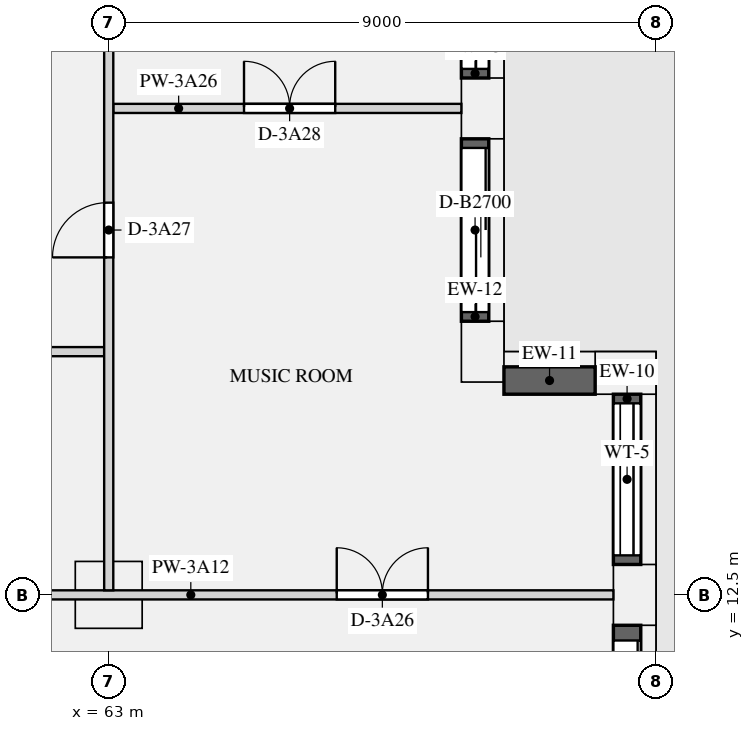
"""IFC4 building model, lengths in metres.
Left out: names, types, materials, properties, quantities, classifications, styles, units other than length and angle.
Written with IfcOpenShell. Run it as: python <this file> out.ifc"""

import sys

from ifc_helpers import new_model, si_unit, direction, frame, frame_2d, origin, origin_2d, place, context, subcontext, project, spatial, rectangle, extrude, element, fill, save


model = new_model("IFC4")
c1 = context("Model", 3, precision=1e-05, world=origin(), true_north=direction((0.0, 1.0)))
c2 = subcontext(c1, "Body", "Model", "MODEL_VIEW")
j1 = project(units=[si_unit("LENGTHUNIT", "METRE"), si_unit("PLANEANGLEUNIT", "RADIAN")], contexts=[c1])
p1 = place(None, origin())
s1 = spatial("IfcSite", under=j1, at=p1, CompositionType="ELEMENT")
p2 = place(p1, origin())
s2 = spatial("IfcBuilding", under=s1, at=p2, CompositionType="ELEMENT")
p3 = place(p2, frame((0.0, 0.0, 141.3)))
s3 = spatial("IfcBuildingStorey", under=s2, at=p3, CompositionType="ELEMENT", Elevation=141.3)
for number, where, z_axis, x_axis in (
    (1, (71.65, 12.5, 0.0), (0.0, 0.0, 1.0), (0.0, 1.0, 0.0)),
    (2, (71.5, 16.15, 0.0), (0.0, 0.0, 1.0), (-1.0, 0.0, 0.0)),
    (3, (69.15, 16.5, 0.0), (0.0, 0.0, 1.0), (0.0, 1.0, 0.0)),
    (4, (69.15, 20.5, 0.0), (0.0, 0.0, 1.0), (0.0, 1.0, 0.0)),
):
    element("IfcColumn", number, at=place(p3, frame(where, z_axis=z_axis, x_axis=x_axis)), inside=s3, PredefinedType="USERDEFINED", context=c2, shape_type="SweptSolid", body=[
        extrude(rectangle(XDim=1.0, YDim=0.7, at=origin_2d()), origin(), (0.0, 0.0, 1.0), 3.15),
    ])
p4 = place(p3, frame((63.0, 12.5, 0.0), z_axis=(0.0, 0.0, 1.0), x_axis=(1.0, 0.0, 0.0)))
e5 = element("IfcColumn", 5, at=p4, inside=s3, PredefinedType="COLUMN", context=c2, shape_type="SweptSolid", body=[
    extrude(rectangle(XDim=1.1, YDim=1.1, at=origin_2d()), origin(), (0.0, 0.0, 1.0), 3.15),
])
p5 = place(p3, frame((71.525, 9.0, 0.0), z_axis=(0.0, 0.0, 1.0), x_axis=(0.0, 1.0, 0.0)))
e6 = element("IfcWall", 6, at=p5, inside=s3, PredefinedType="SOLIDWALL", context=c2, shape_type="SweptSolid", body=[
    extrude(rectangle(XDim=3.0, YDim=0.45, at=frame_2d((1.5, 0.0))), origin(), (0.0, 0.0, 1.0), 2.83),
])
p6 = place(p5, frame((0.25, 0.0, 0.0)))
e7 = element("IfcOpeningElement", 7, at=p6, cuts=e6, PredefinedType="OPENING", context=c2, shape_type="SweptSolid", body=[
    extrude(rectangle(XDim=2.5, YDim=2.3, at=frame_2d((1.25, 1.15))), frame((0.0, 0.235, 0.0), z_axis=(0.0, -1.0, 0.0), x_axis=(1.0, 0.0, 0.0)), (0.0, 0.0, 1.0), 0.47),
])
p7 = place(p3, frame((71.525, 13.0, 0.9), z_axis=(0.0, 0.0, 1.0), x_axis=(0.0, 1.0, 0.0)))
e8 = element("IfcWall", 8, at=p7, inside=s3, PredefinedType="SOLIDWALL", context=c2, shape_type="SweptSolid", body=[
    extrude(rectangle(XDim=2.8, YDim=0.45, at=frame_2d((1.4, 0.0))), origin(), (0.0, 0.0, 1.0), 1.93),
])
p8 = place(p7, frame((0.15, 0.0, 0.15)))
e9 = element("IfcOpeningElement", 9, at=p8, cuts=e8, PredefinedType="OPENING", context=c2, shape_type="SweptSolid", body=[
    extrude(rectangle(XDim=2.5, YDim=1.5, at=frame_2d((1.25, 0.75))), frame((0.0, 0.235, 0.0), z_axis=(0.0, -1.0, 0.0), x_axis=(1.0, 0.0, 0.0)), (0.0, 0.0, 1.0), 0.47),
])
p9 = place(p3, frame((71.0, 16.025, 0.9), z_axis=(0.0, 0.0, 1.0), x_axis=(-1.0, 0.0, 0.0)))
e10 = element("IfcWall", 10, at=p9, inside=s3, PredefinedType="SOLIDWALL", context=c2, shape_type="SweptSolid", body=[
    extrude(rectangle(XDim=1.5, YDim=0.45, at=frame_2d((0.75, 0.0))), origin(), (0.0, 0.0, 1.0), 1.93),
])
p10 = place(p3, frame((69.025, 17.0, 0.0), z_axis=(0.0, 0.0, 1.0), x_axis=(0.0, 1.0, 0.0)))
e11 = element("IfcWall", 11, at=p10, inside=s3, PredefinedType="SOLIDWALL", context=c2, shape_type="SweptSolid", body=[
    extrude(rectangle(XDim=3.0, YDim=0.45, at=frame_2d((1.5, 0.0))), origin(), (0.0, 0.0, 1.0), 2.83),
])
p11 = place(p10, frame((0.15, 0.0, 0.0)))
e12 = element("IfcOpeningElement", 12, at=p11, cuts=e11, PredefinedType="OPENING", context=c2, shape_type="SweptSolid", body=[
    extrude(rectangle(XDim=2.7, YDim=2.3, at=frame_2d((1.35, 1.15))), frame((0.0, 0.235, 0.0), z_axis=(0.0, -1.0, 0.0), x_axis=(1.0, 0.0, 0.0)), (0.0, 0.0, 1.0), 0.47),
])
p12 = place(p3, frame((69.025, 21.0, 0.0), z_axis=(0.0, 0.0, 1.0), x_axis=(0.0, 1.0, 0.0)))
e13 = element("IfcWall", 13, at=p12, inside=s3, PredefinedType="SOLIDWALL", context=c2, shape_type="SweptSolid", body=[
    extrude(rectangle(XDim=3.0, YDim=0.45, at=frame_2d((1.5, 0.0))), origin(), (0.0, 0.0, 1.0), 2.83),
])
p13 = place(p12, frame((0.15, 0.0, 0.0)))
e14 = element("IfcOpeningElement", 14, at=p13, cuts=e13, PredefinedType="OPENING", context=c2, shape_type="SweptSolid", body=[
    extrude(rectangle(XDim=2.7, YDim=2.3, at=frame_2d((1.35, 1.15))), frame((0.0, 0.235, 0.0), z_axis=(0.0, -1.0, 0.0), x_axis=(1.0, 0.0, 0.0)), (0.0, 0.0, 1.0), 0.47),
])
p14 = place(p3, frame((54.0, 12.5, 0.0), z_axis=(0.0, 0.0, 1.0), x_axis=(1.0, 0.0, 0.0)))
e15 = element("IfcWall", 15, at=p14, inside=s3, PredefinedType="PARTITIONING", context=c2, shape_type="SweptSolid", body=[
    extrude(rectangle(XDim=17.3, YDim=0.15, at=frame_2d((8.65, 0.0))), origin(), (0.0, 0.0, 1.0), 2.83),
])
p15 = place(p14, frame((1.5, 0.0, 0.0)))
e16 = element("IfcOpeningElement", 16, at=p15, cuts=e15, PredefinedType="OPENING", context=c2, shape_type="SweptSolid", body=[
    extrude(rectangle(XDim=1.5, YDim=2.1, at=frame_2d((0.75, 1.05))), frame((0.0, 0.085, 0.0), z_axis=(0.0, -1.0, 0.0), x_axis=(1.0, 0.0, 0.0)), (0.0, 0.0, 1.0), 0.17),
])
p16 = place(p14, frame((7.05, 0.0, 0.0)))
e17 = element("IfcOpeningElement", 17, at=p16, cuts=e15, PredefinedType="OPENING", context=c2, shape_type="SweptSolid", body=[
    extrude(rectangle(XDim=0.9, YDim=2.1, at=frame_2d((0.45, 1.05))), frame((0.0, 0.085, 0.0), z_axis=(0.0, -1.0, 0.0), x_axis=(1.0, 0.0, 0.0)), (0.0, 0.0, 1.0), 0.17),
])
p17 = place(p14, frame((12.75, 0.0, 0.0)))
e18 = element("IfcOpeningElement", 18, at=p17, cuts=e15, PredefinedType="OPENING", context=c2, shape_type="SweptSolid", body=[
    extrude(rectangle(XDim=1.5, YDim=2.1, at=frame_2d((0.75, 1.05))), frame((0.0, 0.085, 0.0), z_axis=(0.0, -1.0, 0.0), x_axis=(1.0, 0.0, 0.0)), (0.0, 0.0, 1.0), 0.17),
])
p18 = place(p3, frame((58.575, 16.5, 0.0), z_axis=(0.0, 0.0, 1.0), x_axis=(1.0, 0.0, 0.0)))
e19 = element("IfcWall", 19, at=p18, inside=s3, PredefinedType="PARTITIONING", context=c2, shape_type="SweptSolid", body=[
    extrude(rectangle(XDim=4.35, YDim=0.15, at=frame_2d((2.175, 0.0))), origin(), (0.0, 0.0, 1.0), 2.83),
])
p19 = place(p3, frame((63.075, 20.5, 0.0), z_axis=(0.0, 0.0, 1.0), x_axis=(1.0, 0.0, 0.0)))
e20 = element("IfcWall", 20, at=p19, inside=s3, PredefinedType="PARTITIONING", context=c2, shape_type="SweptSolid", body=[
    extrude(rectangle(XDim=5.725, YDim=0.15, at=frame_2d((2.863, 0.0))), origin(), (0.0, 0.0, 1.0), 2.83),
])
p20 = place(p19, frame((2.15, 0.0, 0.0)))
e21 = element("IfcOpeningElement", 21, at=p20, cuts=e20, PredefinedType="OPENING", context=c2, shape_type="SweptSolid", body=[
    extrude(rectangle(XDim=1.5, YDim=2.1, at=frame_2d((0.75, 1.05))), frame((0.0, 0.085, 0.0), z_axis=(0.0, -1.0, 0.0), x_axis=(1.0, 0.0, 0.0)), (0.0, 0.0, 1.0), 0.17),
])
p21 = place(p3, frame((63.0, 12.575, 0.0), z_axis=(0.0, 0.0, 1.0), x_axis=(0.0, 1.0, 0.0)))
e22 = element("IfcWall", 22, at=p21, inside=s3, PredefinedType="PARTITIONING", context=c2, shape_type="SweptSolid", body=[
    extrude(rectangle(XDim=15.85, YDim=0.15, at=frame_2d((7.925, 0.0))), origin(), (0.0, 0.0, 1.0), 2.83),
])
p22 = place(p21, frame((5.475, 0.0, 0.0)))
e23 = element("IfcOpeningElement", 23, at=p22, cuts=e22, PredefinedType="OPENING", context=c2, shape_type="SweptSolid", body=[
    extrude(rectangle(XDim=0.9, YDim=2.1, at=frame_2d((0.45, 1.05))), frame((0.0, 0.085, 0.0), z_axis=(0.0, -1.0, 0.0), x_axis=(1.0, 0.0, 0.0)), (0.0, 0.0, 1.0), 0.17),
])
p23 = place(p6, origin())
e24 = element("IfcDoor", 24, at=p23, inside=s3, OperationType="SLIDING_TO_LEFT", PredefinedType="DOOR", context=c2, shape_type="SweptSolid", body=[
    extrude(rectangle(XDim=2.5, YDim=2.3, at=frame_2d((1.25, 1.15))), frame((0.0, -0.07, 0.0), z_axis=(0.0, -1.0, 0.0), x_axis=(1.0, 0.0, 0.0)), (0.0, 0.0, 1.0), 0.05),
])
fill(e7, e24)
p24 = place(p8, origin())
e25 = element("IfcWindow", 25, at=p24, inside=s3, PartitioningType="SINGLE_PANEL", PredefinedType="WINDOW", context=c2, shape_type="SweptSolid", body=[
    extrude(rectangle(XDim=2.5, YDim=1.5, at=frame_2d((1.25, 0.75))), frame((0.0, -0.065, 0.0), z_axis=(0.0, -1.0, 0.0), x_axis=(1.0, 0.0, 0.0)), (0.0, 0.0, 1.0), 0.06),
])
fill(e9, e25)
p25 = place(p11, origin())
e26 = element("IfcDoor", 26, at=p25, inside=s3, OperationType="SLIDING_TO_LEFT", PredefinedType="DOOR", context=c2, shape_type="SweptSolid", body=[
    extrude(rectangle(XDim=2.7, YDim=2.3, at=frame_2d((1.35, 1.15))), frame((0.0, -0.07, 0.0), z_axis=(0.0, -1.0, 0.0), x_axis=(1.0, 0.0, 0.0)), (0.0, 0.0, 1.0), 0.05),
])
fill(e12, e26)
p26 = place(p13, origin())
e27 = element("IfcDoor", 27, at=p26, inside=s3, OperationType="SLIDING_TO_LEFT", PredefinedType="DOOR", context=c2, shape_type="SweptSolid", body=[
    extrude(rectangle(XDim=2.7, YDim=2.3, at=frame_2d((1.35, 1.15))), frame((0.0, -0.07, 0.0), z_axis=(0.0, -1.0, 0.0), x_axis=(1.0, 0.0, 0.0)), (0.0, 0.0, 1.0), 0.05),
])
fill(e14, e27)
p27 = place(p17, origin())
e28 = element("IfcDoor", 28, at=p27, inside=s3, OperationType="DOUBLE_DOOR_SINGLE_SWING", PredefinedType="DOOR", context=c2, shape_type="SweptSolid", body=[
    extrude(rectangle(XDim=1.5, YDim=2.1, at=frame_2d((0.75, 1.05))), frame((0.0, 0.025, 0.0), z_axis=(0.0, -1.0, 0.0), x_axis=(1.0, 0.0, 0.0)), (0.0, 0.0, 1.0), 0.05),
])
fill(e18, e28)
p28 = place(p22, origin())
e29 = element("IfcDoor", 29, at=p28, inside=s3, OperationType="SINGLE_SWING_LEFT", PredefinedType="DOOR", context=c2, shape_type="SweptSolid", body=[
    extrude(rectangle(XDim=0.9, YDim=2.1, at=frame_2d((0.45, 1.05))), frame((0.0, 0.025, 0.0), z_axis=(0.0, -1.0, 0.0), x_axis=(1.0, 0.0, 0.0)), (0.0, 0.0, 1.0), 0.05),
])
fill(e23, e29)
p29 = place(p20, origin())
e30 = element("IfcDoor", 30, at=p29, inside=s3, OperationType="DOUBLE_DOOR_SINGLE_SWING", PredefinedType="DOOR", context=c2, shape_type="SweptSolid", body=[
    extrude(rectangle(XDim=1.5, YDim=2.1, at=frame_2d((0.75, 1.05))), frame((0.0, 0.025, 0.0), z_axis=(0.0, -1.0, 0.0), x_axis=(1.0, 0.0, 0.0)), (0.0, 0.0, 1.0), 0.05),
])
fill(e21, e30)
save(model, sys.argv[1])
